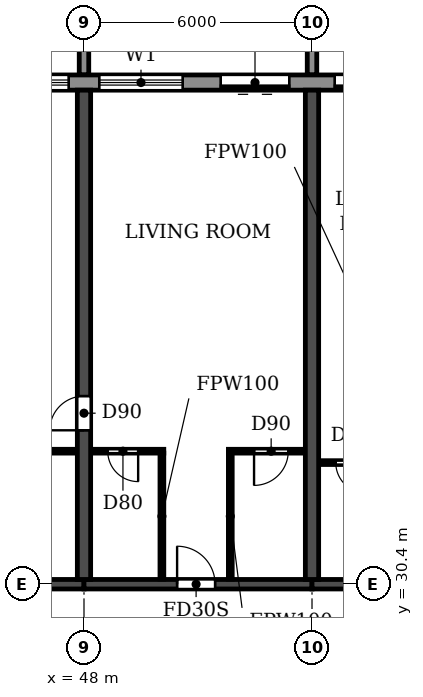
"""IFC4 building model, lengths in metres.
Left out: names, types, materials, properties, quantities, classifications, styles, units other than length and angle.
Written with IfcOpenShell. Run it as: python <this file> out.ifc"""

import sys

from ifc_helpers import new_model, si_unit, direction, frame, frame_2d, origin, place, context, subcontext, project, spatial, polyline, rectangle, outline, extrude, source, transform, mapped, element, fill, save


model = new_model("IFC4")
c1 = context("Model", 3, precision=1e-05, world=origin(), true_north=direction((0.0, 1.0)))
c2 = subcontext(c1, "Body", "Model", "MODEL_VIEW")
j1 = project(units=[si_unit("LENGTHUNIT", "METRE"), si_unit("PLANEANGLEUNIT", "RADIAN")], contexts=[c1])
p1 = place(None, origin())
s1 = spatial("IfcSite", under=j1, at=p1, CompositionType="ELEMENT")
p2 = place(p1, origin())
s2 = spatial("IfcBuilding", under=s1, at=p2, CompositionType="ELEMENT")
p3 = place(p2, frame((0.0, 0.0, 92.7)))
s3 = spatial("IfcBuildingStorey", under=s2, at=p3, CompositionType="ELEMENT", Elevation=92.7)
p4 = place(p3, frame((48.0, 30.525, 0.0), z_axis=(0.0, 0.0, 1.0), x_axis=(0.0, 1.0, 0.0)))
e1 = element("IfcWall", 1, at=p4, inside=s3, PredefinedType="SHEAR", context=c2, shape_type="SweptSolid", body=[
    extrude(rectangle(XDim=12.875, YDim=0.35, at=frame_2d((6.438, 0.0))), origin(), (0.0, 0.0, 1.0), 3.06),
])
p5 = place(p4, frame((3.925, 0.0, 0.0)))
e2 = element("IfcOpeningElement", 2, at=p5, cuts=e1, PredefinedType="OPENING", context=c2, shape_type="SweptSolid", body=[
    extrude(rectangle(XDim=0.9, YDim=2.1, at=frame_2d((0.45, 1.05))), frame((0.0, 0.185, 0.0), z_axis=(0.0, -1.0, 0.0), x_axis=(1.0, 0.0, 0.0)), (0.0, 0.0, 1.0), 0.37),
])
p6 = place(p3, frame((54.0, 30.525, 0.0), z_axis=(0.0, 0.0, 1.0), x_axis=(0.0, 1.0, 0.0)))
e3 = element("IfcWall", 3, at=p6, inside=s3, PredefinedType="SHEAR", context=c2, shape_type="SweptSolid", body=[
    extrude(rectangle(XDim=12.875, YDim=0.35, at=frame_2d((6.438, 0.0))), origin(), (0.0, 0.0, 1.0), 3.06),
])
p7 = place(p3, frame((42.0, 30.4, 0.0), z_axis=(0.0, 0.0, 1.0), x_axis=(1.0, 0.0, 0.0)))
e4 = element("IfcWall", 4, at=p7, inside=s3, PredefinedType="SHEAR", context=c2, shape_type="SweptSolid", body=[
    extrude(rectangle(XDim=6.0, YDim=0.25, at=frame_2d((3.0, 0.0))), origin(), (0.0, 0.0, 1.0), 2.46),
])
p8 = place(p3, frame((48.0, 30.4, 0.0), z_axis=(0.0, 0.0, 1.0), x_axis=(1.0, 0.0, 0.0)))
e5 = element("IfcWall", 5, at=p8, inside=s3, PredefinedType="SHEAR", context=c2, shape_type="SweptSolid", body=[
    extrude(rectangle(XDim=6.0, YDim=0.25, at=frame_2d((3.0, 0.0))), origin(), (0.0, 0.0, 1.0), 2.46),
])
p9 = place(p8, frame((2.45, 0.0, 0.0)))
e6 = element("IfcOpeningElement", 6, at=p9, cuts=e5, PredefinedType="OPENING", context=c2, shape_type="SweptSolid", body=[
    extrude(rectangle(XDim=1.0, YDim=2.1, at=frame_2d((0.5, 1.05))), frame((0.0, 0.135, 0.0), z_axis=(0.0, -1.0, 0.0), x_axis=(1.0, 0.0, 0.0)), (0.0, 0.0, 1.0), 0.27),
])
p10 = place(p3, frame((54.0, 30.4, 0.0), z_axis=(0.0, 0.0, 1.0), x_axis=(1.0, 0.0, 0.0)))
e7 = element("IfcWall", 7, at=p10, inside=s3, PredefinedType="SHEAR", context=c2, shape_type="SweptSolid", body=[
    extrude(rectangle(XDim=6.0, YDim=0.25, at=frame_2d((3.0, 0.0))), origin(), (0.0, 0.0, 1.0), 2.46),
])
p11 = place(p10, frame((2.45, 0.0, 0.0)))
e8 = element("IfcOpeningElement", 8, at=p11, cuts=e7, PredefinedType="OPENING", context=c2, shape_type="SweptSolid", body=[
    extrude(rectangle(XDim=1.0, YDim=2.1, at=frame_2d((0.5, 1.05))), frame((0.0, 0.135, 0.0), z_axis=(0.0, -1.0, 0.0), x_axis=(1.0, 0.0, 0.0)), (0.0, 0.0, 1.0), 0.27),
])
p12 = place(p3, frame((91.317, 43.6, 0.0), z_axis=(0.0, 0.0, 1.0), x_axis=(-1.0, 0.0, 0.0)))
e9 = element("IfcWall", 9, at=p12, inside=s3, PredefinedType="STANDARD", context=c2, shape_type="SweptSolid", body=[
    extrude(rectangle(XDim=80.634, YDim=0.4, at=frame_2d((40.317, 0.0))), origin(), (0.0, 0.0, 1.0), 3.06),
])
p13 = place(p12, frame((76.717, 0.0, 0.9)))
e10 = element("IfcOpeningElement", 10, at=p13, cuts=e9, PredefinedType="OPENING", context=c2, shape_type="SweptSolid", body=[
    extrude(rectangle(XDim=2.2, YDim=1.5, at=frame_2d((1.1, 0.75))), frame((0.0, 0.21, 0.0), z_axis=(0.0, -1.0, 0.0), x_axis=(1.0, 0.0, 0.0)), (0.0, 0.0, 1.0), 0.42),
])
p14 = place(p12, frame((73.917, 0.0, 0.0)))
e11 = element("IfcOpeningElement", 11, at=p14, cuts=e9, PredefinedType="OPENING", context=c2, shape_type="SweptSolid", body=[
    extrude(rectangle(XDim=1.8, YDim=2.4, at=frame_2d((0.9, 1.2))), frame((0.0, 0.21, 0.0), z_axis=(0.0, -1.0, 0.0), x_axis=(1.0, 0.0, 0.0)), (0.0, 0.0, 1.0), 0.42),
])
p15 = place(p12, frame((70.717, 0.0, 0.9)))
e12 = element("IfcOpeningElement", 12, at=p15, cuts=e9, PredefinedType="OPENING", context=c2, shape_type="SweptSolid", body=[
    extrude(rectangle(XDim=2.2, YDim=1.5, at=frame_2d((1.1, 0.75))), frame((0.0, 0.21, 0.0), z_axis=(0.0, -1.0, 0.0), x_axis=(1.0, 0.0, 0.0)), (0.0, 0.0, 1.0), 0.42),
])
p16 = place(p12, frame((67.717, 0.0, 0.9)))
e13 = element("IfcOpeningElement", 13, at=p16, cuts=e9, PredefinedType="OPENING", context=c2, shape_type="SweptSolid", body=[
    extrude(rectangle(XDim=2.2, YDim=1.5, at=frame_2d((1.1, 0.75))), frame((0.0, 0.21, 0.0), z_axis=(0.0, -1.0, 0.0), x_axis=(1.0, 0.0, 0.0)), (0.0, 0.0, 1.0), 0.42),
])
p17 = place(p12, frame((64.717, 0.0, 0.9)))
e14 = element("IfcOpeningElement", 14, at=p17, cuts=e9, PredefinedType="OPENING", context=c2, shape_type="SweptSolid", body=[
    extrude(rectangle(XDim=2.2, YDim=1.5, at=frame_2d((1.1, 0.75))), frame((0.0, 0.21, 0.0), z_axis=(0.0, -1.0, 0.0), x_axis=(1.0, 0.0, 0.0)), (0.0, 0.0, 1.0), 0.42),
])
p18 = place(p12, frame((61.917, 0.0, 0.0)))
e15 = element("IfcOpeningElement", 15, at=p18, cuts=e9, PredefinedType="OPENING", context=c2, shape_type="SweptSolid", body=[
    extrude(rectangle(XDim=1.8, YDim=2.4, at=frame_2d((0.9, 1.2))), frame((0.0, 0.21, 0.0), z_axis=(0.0, -1.0, 0.0), x_axis=(1.0, 0.0, 0.0)), (0.0, 0.0, 1.0), 0.42),
])
p19 = place(p12, frame((58.717, 0.0, 0.9)))
e16 = element("IfcOpeningElement", 16, at=p19, cuts=e9, PredefinedType="OPENING", context=c2, shape_type="SweptSolid", body=[
    extrude(rectangle(XDim=2.2, YDim=1.5, at=frame_2d((1.1, 0.75))), frame((0.0, 0.21, 0.0), z_axis=(0.0, -1.0, 0.0), x_axis=(1.0, 0.0, 0.0)), (0.0, 0.0, 1.0), 0.42),
])
p20 = place(p12, frame((55.717, 0.0, 0.9)))
e17 = element("IfcOpeningElement", 17, at=p20, cuts=e9, PredefinedType="OPENING", context=c2, shape_type="SweptSolid", body=[
    extrude(rectangle(XDim=2.2, YDim=1.5, at=frame_2d((1.1, 0.75))), frame((0.0, 0.21, 0.0), z_axis=(0.0, -1.0, 0.0), x_axis=(1.0, 0.0, 0.0)), (0.0, 0.0, 1.0), 0.42),
])
p21 = place(p12, frame((52.917, 0.0, 0.0)))
e18 = element("IfcOpeningElement", 18, at=p21, cuts=e9, PredefinedType="OPENING", context=c2, shape_type="SweptSolid", body=[
    extrude(rectangle(XDim=1.8, YDim=2.4, at=frame_2d((0.9, 1.2))), frame((0.0, 0.21, 0.0), z_axis=(0.0, -1.0, 0.0), x_axis=(1.0, 0.0, 0.0)), (0.0, 0.0, 1.0), 0.42),
])
p22 = place(p12, frame((49.717, 0.0, 0.9)))
e19 = element("IfcOpeningElement", 19, at=p22, cuts=e9, PredefinedType="OPENING", context=c2, shape_type="SweptSolid", body=[
    extrude(rectangle(XDim=2.2, YDim=1.5, at=frame_2d((1.1, 0.75))), frame((0.0, 0.21, 0.0), z_axis=(0.0, -1.0, 0.0), x_axis=(1.0, 0.0, 0.0)), (0.0, 0.0, 1.0), 0.42),
])
p23 = place(p12, frame((46.717, 0.0, 0.9)))
e20 = element("IfcOpeningElement", 20, at=p23, cuts=e9, PredefinedType="OPENING", context=c2, shape_type="SweptSolid", body=[
    extrude(rectangle(XDim=2.2, YDim=1.5, at=frame_2d((1.1, 0.75))), frame((0.0, 0.21, 0.0), z_axis=(0.0, -1.0, 0.0), x_axis=(1.0, 0.0, 0.0)), (0.0, 0.0, 1.0), 0.42),
])
p24 = place(p12, frame((43.717, 0.0, 0.9)))
e21 = element("IfcOpeningElement", 21, at=p24, cuts=e9, PredefinedType="OPENING", context=c2, shape_type="SweptSolid", body=[
    extrude(rectangle(XDim=2.2, YDim=1.5, at=frame_2d((1.1, 0.75))), frame((0.0, 0.21, 0.0), z_axis=(0.0, -1.0, 0.0), x_axis=(1.0, 0.0, 0.0)), (0.0, 0.0, 1.0), 0.42),
])
p25 = place(p12, frame((40.717, 0.0, 0.9)))
e22 = element("IfcOpeningElement", 22, at=p25, cuts=e9, PredefinedType="OPENING", context=c2, shape_type="SweptSolid", body=[
    extrude(rectangle(XDim=2.2, YDim=1.5, at=frame_2d((1.1, 0.75))), frame((0.0, 0.21, 0.0), z_axis=(0.0, -1.0, 0.0), x_axis=(1.0, 0.0, 0.0)), (0.0, 0.0, 1.0), 0.42),
])
p26 = place(p12, frame((37.917, 0.0, 0.0)))
e23 = element("IfcOpeningElement", 23, at=p26, cuts=e9, PredefinedType="OPENING", context=c2, shape_type="SweptSolid", body=[
    extrude(rectangle(XDim=1.8, YDim=2.4, at=frame_2d((0.9, 1.2))), frame((0.0, 0.21, 0.0), z_axis=(0.0, -1.0, 0.0), x_axis=(1.0, 0.0, 0.0)), (0.0, 0.0, 1.0), 0.42),
])
p27 = place(p12, frame((34.917, 0.0, 0.0)))
e24 = element("IfcOpeningElement", 24, at=p27, cuts=e9, PredefinedType="OPENING", context=c2, shape_type="SweptSolid", body=[
    extrude(rectangle(XDim=1.8, YDim=2.4, at=frame_2d((0.9, 1.2))), frame((0.0, 0.21, 0.0), z_axis=(0.0, -1.0, 0.0), x_axis=(1.0, 0.0, 0.0)), (0.0, 0.0, 1.0), 0.42),
])
p28 = place(p12, frame((31.717, 0.0, 0.9)))
e25 = element("IfcOpeningElement", 25, at=p28, cuts=e9, PredefinedType="OPENING", context=c2, shape_type="SweptSolid", body=[
    extrude(rectangle(XDim=2.2, YDim=1.5, at=frame_2d((1.1, 0.75))), frame((0.0, 0.21, 0.0), z_axis=(0.0, -1.0, 0.0), x_axis=(1.0, 0.0, 0.0)), (0.0, 0.0, 1.0), 0.42),
])
p29 = place(p12, frame((28.717, 0.0, 0.9)))
e26 = element("IfcOpeningElement", 26, at=p29, cuts=e9, PredefinedType="OPENING", context=c2, shape_type="SweptSolid", body=[
    extrude(rectangle(XDim=2.2, YDim=1.5, at=frame_2d((1.1, 0.75))), frame((0.0, 0.21, 0.0), z_axis=(0.0, -1.0, 0.0), x_axis=(1.0, 0.0, 0.0)), (0.0, 0.0, 1.0), 0.42),
])
p30 = place(p12, frame((25.717, 0.0, 0.9)))
e27 = element("IfcOpeningElement", 27, at=p30, cuts=e9, PredefinedType="OPENING", context=c2, shape_type="SweptSolid", body=[
    extrude(rectangle(XDim=2.2, YDim=1.5, at=frame_2d((1.1, 0.75))), frame((0.0, 0.21, 0.0), z_axis=(0.0, -1.0, 0.0), x_axis=(1.0, 0.0, 0.0)), (0.0, 0.0, 1.0), 0.42),
])
p31 = place(p12, frame((22.717, 0.0, 0.9)))
e28 = element("IfcOpeningElement", 28, at=p31, cuts=e9, PredefinedType="OPENING", context=c2, shape_type="SweptSolid", body=[
    extrude(rectangle(XDim=2.2, YDim=1.5, at=frame_2d((1.1, 0.75))), frame((0.0, 0.21, 0.0), z_axis=(0.0, -1.0, 0.0), x_axis=(1.0, 0.0, 0.0)), (0.0, 0.0, 1.0), 0.42),
])
p32 = place(p12, frame((19.917, 0.0, 0.0)))
e29 = element("IfcOpeningElement", 29, at=p32, cuts=e9, PredefinedType="OPENING", context=c2, shape_type="SweptSolid", body=[
    extrude(rectangle(XDim=1.8, YDim=2.4, at=frame_2d((0.9, 1.2))), frame((0.0, 0.21, 0.0), z_axis=(0.0, -1.0, 0.0), x_axis=(1.0, 0.0, 0.0)), (0.0, 0.0, 1.0), 0.42),
])
p33 = place(p12, frame((16.717, 0.0, 0.9)))
e30 = element("IfcOpeningElement", 30, at=p33, cuts=e9, PredefinedType="OPENING", context=c2, shape_type="SweptSolid", body=[
    extrude(rectangle(XDim=2.2, YDim=1.5, at=frame_2d((1.1, 0.75))), frame((0.0, 0.21, 0.0), z_axis=(0.0, -1.0, 0.0), x_axis=(1.0, 0.0, 0.0)), (0.0, 0.0, 1.0), 0.42),
])
p34 = place(p12, frame((13.917, 0.0, 0.0)))
e31 = element("IfcOpeningElement", 31, at=p34, cuts=e9, PredefinedType="OPENING", context=c2, shape_type="SweptSolid", body=[
    extrude(rectangle(XDim=1.8, YDim=2.4, at=frame_2d((0.9, 1.2))), frame((0.0, 0.21, 0.0), z_axis=(0.0, -1.0, 0.0), x_axis=(1.0, 0.0, 0.0)), (0.0, 0.0, 1.0), 0.42),
])
p35 = place(p12, frame((10.717, 0.0, 0.9)))
e32 = element("IfcOpeningElement", 32, at=p35, cuts=e9, PredefinedType="OPENING", context=c2, shape_type="SweptSolid", body=[
    extrude(rectangle(XDim=2.2, YDim=1.5, at=frame_2d((1.1, 0.75))), frame((0.0, 0.21, 0.0), z_axis=(0.0, -1.0, 0.0), x_axis=(1.0, 0.0, 0.0)), (0.0, 0.0, 1.0), 0.42),
])
p36 = place(p12, frame((7.917, 0.0, 0.0)))
e33 = element("IfcOpeningElement", 33, at=p36, cuts=e9, PredefinedType="OPENING", context=c2, shape_type="SweptSolid", body=[
    extrude(rectangle(XDim=1.8, YDim=2.4, at=frame_2d((0.9, 1.2))), frame((0.0, 0.21, 0.0), z_axis=(0.0, -1.0, 0.0), x_axis=(1.0, 0.0, 0.0)), (0.0, 0.0, 1.0), 0.42),
])
p37 = place(p12, frame((4.717, 0.0, 0.9)))
e34 = element("IfcOpeningElement", 34, at=p37, cuts=e9, PredefinedType="OPENING", context=c2, shape_type="SweptSolid", body=[
    extrude(rectangle(XDim=2.2, YDim=1.5, at=frame_2d((1.1, 0.75))), frame((0.0, 0.21, 0.0), z_axis=(0.0, -1.0, 0.0), x_axis=(1.0, 0.0, 0.0)), (0.0, 0.0, 1.0), 0.42),
])
p38 = place(p12, frame((1.917, 0.0, 0.0)))
e35 = element("IfcOpeningElement", 35, at=p38, cuts=e9, PredefinedType="OPENING", context=c2, shape_type="SweptSolid", body=[
    extrude(rectangle(XDim=1.8, YDim=2.4, at=frame_2d((0.9, 1.2))), frame((0.0, 0.21, 0.0), z_axis=(0.0, -1.0, 0.0), x_axis=(1.0, 0.0, 0.0)), (0.0, 0.0, 1.0), 0.42),
])
m1 = source(origin(), c2, "Body", "SweptSolid", [
    extrude(outline(polyline([(0.0, 0.0), (0.25, 0.0), (0.25, 3.1), (0.0, 3.1), (0.0, 0.0)])), origin(), (0.0, 0.0, 1.0), 3.1),
])
for number, where in (
    (36, (47.875, 43.8, 0.0)),
    (37, (53.875, 43.8, 0.0)),
):
    element("IfcWall", number, at=place(p3, frame(where)), inside=s3, PredefinedType="STANDARD", context=c2, shape_type="MappedRepresentation", body=[
        mapped(m1, transform((0.0, 0.0, 0.0))),
    ])
p39 = place(p3, frame((54.185, 33.6, 0.0), z_axis=(0.0, 0.0, 1.0), x_axis=(1.0, 0.0, 0.0)))
e38 = element("IfcWall", 38, at=p39, inside=s3, PredefinedType="PARTITIONING", context=c2, shape_type="SweptSolid", body=[
    extrude(rectangle(XDim=1.915, YDim=0.1, at=frame_2d((0.958, 0.0))), origin(), (0.0, 0.0, 1.0), 3.06),
])
p40 = place(p39, frame((0.44, 0.0, 0.0)))
e39 = element("IfcOpeningElement", 39, at=p40, cuts=e38, PredefinedType="OPENING", context=c2, shape_type="SweptSolid", body=[
    extrude(rectangle(XDim=0.8, YDim=2.1, at=frame_2d((0.4, 1.05))), frame((0.0, 0.06, 0.0), z_axis=(0.0, -1.0, 0.0), x_axis=(1.0, 0.0, 0.0)), (0.0, 0.0, 1.0), 0.12),
])
p41 = place(p3, frame((45.1, 33.9, 0.0), z_axis=(0.0, 0.0, 1.0), x_axis=(1.0, 0.0, 0.0)))
e40 = element("IfcWall", 40, at=p41, inside=s3, PredefinedType="PARTITIONING", context=c2, shape_type="SweptSolid", body=[
    extrude(rectangle(XDim=2.715, YDim=0.1, at=frame_2d((1.357, 0.0))), origin(), (0.0, 0.0, 1.0), 3.06),
])
p42 = place(p41, frame((1.0, 0.0, 0.0)))
e41 = element("IfcOpeningElement", 41, at=p42, cuts=e40, PredefinedType="OPENING", context=c2, shape_type="SweptSolid", body=[
    extrude(rectangle(XDim=0.8, YDim=2.1, at=frame_2d((0.4, 1.05))), frame((0.0, 0.06, 0.0), z_axis=(0.0, -1.0, 0.0), x_axis=(1.0, 0.0, 0.0)), (0.0, 0.0, 1.0), 0.12),
])
p43 = place(p3, frame((48.185, 33.9, 0.0), z_axis=(0.0, 0.0, 1.0), x_axis=(1.0, 0.0, 0.0)))
e42 = element("IfcWall", 42, at=p43, inside=s3, PredefinedType="PARTITIONING", context=c2, shape_type="SweptSolid", body=[
    extrude(rectangle(XDim=1.915, YDim=0.1, at=frame_2d((0.958, 0.0))), origin(), (0.0, 0.0, 1.0), 3.06),
])
p44 = place(p43, frame((0.44, 0.0, 0.0)))
e43 = element("IfcOpeningElement", 43, at=p44, cuts=e42, PredefinedType="OPENING", context=c2, shape_type="SweptSolid", body=[
    extrude(rectangle(XDim=0.8, YDim=2.1, at=frame_2d((0.4, 1.05))), frame((0.0, 0.06, 0.0), z_axis=(0.0, -1.0, 0.0), x_axis=(1.0, 0.0, 0.0)), (0.0, 0.0, 1.0), 0.12),
])
p45 = place(p3, frame((51.8, 33.9, 0.0), z_axis=(0.0, 0.0, 1.0), x_axis=(1.0, 0.0, 0.0)))
e44 = element("IfcWall", 44, at=p45, inside=s3, PredefinedType="PARTITIONING", context=c2, shape_type="SweptSolid", body=[
    extrude(rectangle(XDim=2.015, YDim=0.1, at=frame_2d((1.007, 0.0))), origin(), (0.0, 0.0, 1.0), 3.06),
])
p46 = place(p45, frame((0.675, 0.0, 0.0)))
e45 = element("IfcOpeningElement", 45, at=p46, cuts=e44, PredefinedType="OPENING", context=c2, shape_type="SweptSolid", body=[
    extrude(rectangle(XDim=0.9, YDim=2.1, at=frame_2d((0.45, 1.05))), frame((0.0, 0.06, 0.0), z_axis=(0.0, -1.0, 0.0), x_axis=(1.0, 0.0, 0.0)), (0.0, 0.0, 1.0), 0.12),
])
for number, where, z_axis, x_axis in (
    (46, (50.05, 30.535, 0.0), (0.0, 0.0, 1.0), (0.0, 1.0, 0.0)),
    (47, (51.85, 30.535, 0.0), (0.0, 0.0, 1.0), (0.0, 1.0, 0.0)),
):
    element("IfcWall", number, at=place(p3, frame(where, z_axis=z_axis, x_axis=x_axis)), inside=s3, PredefinedType="PARTITIONING", context=c2, shape_type="SweptSolid", body=[
        extrude(rectangle(XDim=3.315, YDim=0.1, at=frame_2d((1.658, 0.0))), origin(), (0.0, 0.0, 1.0), 3.06),
    ])
p47 = place(p24, origin())
e48 = element("IfcWindow", 48, at=p47, inside=s3, PartitioningType="DOUBLE_PANEL_HORIZONTAL", PredefinedType="WINDOW", context=c2, shape_type="SweptSolid", body=[
    extrude(rectangle(XDim=2.2, YDim=1.5, at=frame_2d((1.1, 0.75))), frame((0.0, 0.03, 0.0), z_axis=(0.0, -1.0, 0.0), x_axis=(1.0, 0.0, 0.0)), (0.0, 0.0, 1.0), 0.06),
])
fill(e21, e48)
p48 = place(p25, origin())
e49 = element("IfcWindow", 49, at=p48, inside=s3, PartitioningType="DOUBLE_PANEL_HORIZONTAL", PredefinedType="WINDOW", context=c2, shape_type="SweptSolid", body=[
    extrude(rectangle(XDim=2.2, YDim=1.5, at=frame_2d((1.1, 0.75))), frame((0.0, 0.03, 0.0), z_axis=(0.0, -1.0, 0.0), x_axis=(1.0, 0.0, 0.0)), (0.0, 0.0, 1.0), 0.06),
])
fill(e22, e49)
p49 = place(p26, origin())
e50 = element("IfcDoor", 50, at=p49, inside=s3, OperationType="DOUBLE_DOOR_SLIDING", PredefinedType="DOOR", context=c2, shape_type="SweptSolid", body=[
    extrude(rectangle(XDim=1.8, YDim=2.4, at=frame_2d((0.9, 1.2))), frame((0.0, 0.025, 0.0), z_axis=(0.0, -1.0, 0.0), x_axis=(1.0, 0.0, 0.0)), (0.0, 0.0, 1.0), 0.05),
])
fill(e23, e50)
p50 = place(p27, origin())
e51 = element("IfcDoor", 51, at=p50, inside=s3, OperationType="DOUBLE_DOOR_SLIDING", PredefinedType="DOOR", context=c2, shape_type="SweptSolid", body=[
    extrude(rectangle(XDim=1.8, YDim=2.4, at=frame_2d((0.9, 1.2))), frame((0.0, 0.025, 0.0), z_axis=(0.0, -1.0, 0.0), x_axis=(1.0, 0.0, 0.0)), (0.0, 0.0, 1.0), 0.05),
])
fill(e24, e51)
p51 = place(p5, origin())
e52 = element("IfcDoor", 52, at=p51, inside=s3, OperationType="SINGLE_SWING_LEFT", PredefinedType="DOOR", context=c2, shape_type="SweptSolid", body=[
    extrude(rectangle(XDim=0.9, YDim=2.1, at=frame_2d((0.45, 1.05))), frame((0.0, 0.025, 0.0), z_axis=(0.0, -1.0, 0.0), x_axis=(1.0, 0.0, 0.0)), (0.0, 0.0, 1.0), 0.05),
])
fill(e2, e52)
p52 = place(p44, frame((0.8, 0.0, 0.0), z_axis=(0.0, 0.0, 1.0), x_axis=(-1.0, 0.0, 0.0)))
e53 = element("IfcDoor", 53, at=p52, inside=s3, OperationType="SINGLE_SWING_LEFT", PredefinedType="DOOR", context=c2, shape_type="SweptSolid", body=[
    extrude(rectangle(XDim=0.8, YDim=2.1, at=frame_2d((0.4, 1.05))), frame((0.0, 0.025, 0.0), z_axis=(0.0, -1.0, 0.0), x_axis=(1.0, 0.0, 0.0)), (0.0, 0.0, 1.0), 0.05),
])
fill(e43, e53)
p53 = place(p9, origin())
e54 = element("IfcDoor", 54, at=p53, inside=s3, OperationType="SINGLE_SWING_LEFT", PredefinedType="DOOR", context=c2, shape_type="SweptSolid", body=[
    extrude(rectangle(XDim=1.0, YDim=2.1, at=frame_2d((0.5, 1.05))), frame((0.0, 0.025, 0.0), z_axis=(0.0, -1.0, 0.0), x_axis=(1.0, 0.0, 0.0)), (0.0, 0.0, 1.0), 0.05),
])
fill(e6, e54)
p54 = place(p46, frame((0.9, 0.0, 0.0), z_axis=(0.0, 0.0, 1.0), x_axis=(-1.0, 0.0, 0.0)))
e55 = element("IfcDoor", 55, at=p54, inside=s3, OperationType="SINGLE_SWING_RIGHT", PredefinedType="DOOR", context=c2, shape_type="SweptSolid", body=[
    extrude(rectangle(XDim=0.9, YDim=2.1, at=frame_2d((0.45, 1.05))), frame((0.0, 0.025, 0.0), z_axis=(0.0, -1.0, 0.0), x_axis=(1.0, 0.0, 0.0)), (0.0, 0.0, 1.0), 0.05),
])
fill(e45, e55)
p55 = place(p40, frame((0.8, 0.0, 0.0), z_axis=(0.0, 0.0, 1.0), x_axis=(-1.0, 0.0, 0.0)))
e56 = element("IfcDoor", 56, at=p55, inside=s3, OperationType="SINGLE_SWING_LEFT", PredefinedType="DOOR", context=c2, shape_type="SweptSolid", body=[
    extrude(rectangle(XDim=0.8, YDim=2.1, at=frame_2d((0.4, 1.05))), frame((0.0, 0.025, 0.0), z_axis=(0.0, -1.0, 0.0), x_axis=(1.0, 0.0, 0.0)), (0.0, 0.0, 1.0), 0.05),
])
fill(e39, e56)
save(model, sys.argv[1])
